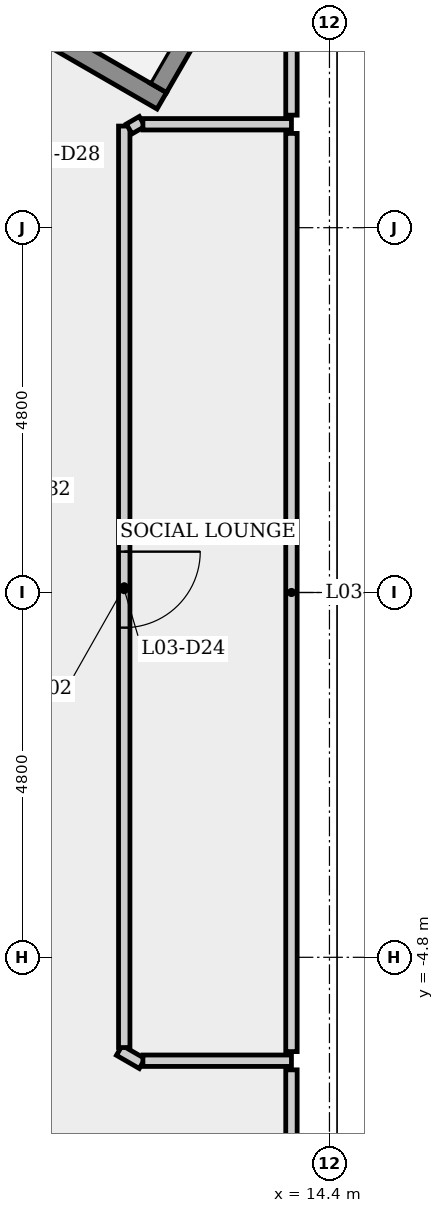
"""IFC4 building model, lengths in metres.
Left out: names, types, materials, properties, quantities, classifications, styles, units other than length and angle.
Written with IfcOpenShell. Run it as: python <this file> out.ifc"""

import sys

from ifc_helpers import new_model, si_unit, direction, frame, frame_2d, origin, place, context, subcontext, project, spatial, rectangle, extrude, element, fill, save


model = new_model("IFC4")
c1 = context("Model", 3, precision=1e-05, world=origin(), true_north=direction((0.0, 1.0)))
c2 = subcontext(c1, "Body", "Model", "MODEL_VIEW")
j1 = project(units=[si_unit("LENGTHUNIT", "METRE"), si_unit("PLANEANGLEUNIT", "RADIAN")], contexts=[c1])
p1 = place(None, origin())
s1 = spatial("IfcSite", under=j1, at=p1, CompositionType="ELEMENT")
p2 = place(p1, origin())
s2 = spatial("IfcBuilding", under=s1, at=p2, CompositionType="ELEMENT")
p3 = place(p2, frame((0.0, 0.0, 16.0)))
s3 = spatial("IfcBuildingStorey", under=s2, at=p3, CompositionType="ELEMENT", Elevation=16.0)
p4 = place(p3, frame((11.635, -6.025, 0.0), z_axis=(0.0, 0.0, 1.0), x_axis=(0.866115353951, -0.499844169366, 0.0)))
e1 = element("IfcWall", 1, at=p4, inside=s3, PredefinedType="PARTITIONING", context=c2, shape_type="SweptSolid", body=[
    extrude(rectangle(XDim=0.347, YDim=0.15, at=frame_2d((0.174, 0.0))), origin(), (0.0, 0.0, 1.0), 4.05),
])
p5 = place(p3, frame((11.7, 6.137, 0.0), z_axis=(0.0, 0.0, 1.0), x_axis=(0.0, -1.0, 0.0)))
e2 = element("IfcWall", 2, at=p5, inside=s3, PredefinedType="PARTITIONING", context=c2, shape_type="SweptSolid", body=[
    extrude(rectangle(XDim=12.125, YDim=0.15, at=frame_2d((6.062, 0.0))), origin(), (0.0, 0.0, 1.0), 4.05),
])
p6 = place(p5, frame((5.6, 0.0, 0.0)))
e3 = element("IfcOpeningElement", 3, at=p6, cuts=e2, PredefinedType="OPENING", context=c2, shape_type="SweptSolid", body=[
    extrude(rectangle(XDim=1.0, YDim=2.1, at=frame_2d((0.5, 1.05))), frame((0.0, 0.085, 0.0), z_axis=(0.0, -1.0, 0.0), x_axis=(1.0, 0.0, 0.0)), (0.0, 0.0, 1.0), 0.17),
])
p7 = place(p3, frame((11.946, -6.161, 0.0), z_axis=(0.0, 0.0, 1.0), x_axis=(1.0, 0.0, 0.0)))
e4 = element("IfcWall", 4, at=p7, inside=s3, PredefinedType="PARTITIONING", context=c2, shape_type="SweptSolid", body=[
    extrude(rectangle(XDim=1.954, YDim=0.15, at=frame_2d((0.977, 0.0))), origin(), (0.0, 0.0, 1.0), 4.05),
])
p8 = place(p3, frame((11.936, 6.198, 0.0), z_axis=(0.0, 0.0, 1.0), x_axis=(-0.866103179807, -0.499865263774, 0.0)))
e5 = element("IfcWall", 5, at=p8, inside=s3, PredefinedType="PARTITIONING", context=c2, shape_type="SweptSolid", body=[
    extrude(rectangle(XDim=0.197, YDim=0.15, at=frame_2d((0.099, 0.0))), origin(), (0.0, 0.0, 1.0), 4.05),
])
p9 = place(p3, frame((12.194, 6.47, 0.0), z_axis=(0.0, 0.0, 1.0), x_axis=(-0.866025499775, 0.499999833739, 0.0)))
e6 = element("IfcWall", 6, at=p9, inside=s3, PredefinedType="SHEAR", context=c2, shape_type="SweptSolid", body=[
    extrude(rectangle(XDim=6.4, YDim=0.25, at=frame_2d((3.2, 0.0))), origin(), (0.0, 0.0, 1.0), 4.05),
])
p10 = place(p9, frame((5.25, 0.0, 0.0)))
e7 = element("IfcOpeningElement", 7, at=p10, cuts=e6, PredefinedType="OPENING", context=c2, shape_type="SweptSolid", body=[
    extrude(rectangle(XDim=1.0, YDim=2.1, at=frame_2d((0.5, 1.05))), frame((0.0, 0.135, 0.0), z_axis=(0.0, -1.0, 0.0), x_axis=(1.0, 0.0, 0.0)), (0.0, 0.0, 1.0), 0.27),
])
p11 = place(p3, frame((13.755, 9.424, 0.0), z_axis=(0.0, 0.0, 1.0), x_axis=(-0.500011789842, -0.866018596809, 0.0)))
e8 = element("IfcWall", 8, at=p11, inside=s3, PredefinedType="SHEAR", context=c2, shape_type="SweptSolid", body=[
    extrude(rectangle(XDim=3.214, YDim=0.25, at=frame_2d((1.607, 0.0))), origin(), (0.0, 0.0, 1.0), 4.05),
])
p12 = place(p3, frame((13.9, -6.281, 0.0), z_axis=(0.0, 0.0, 1.0), x_axis=(0.0, -1.0, 0.0)))
e9 = element("IfcWall", 9, at=p12, inside=s3, PredefinedType="PARTITIONING", context=c2, shape_type="SweptSolid", body=[
    extrude(rectangle(XDim=3.012, YDim=0.15, at=frame_2d((1.506, 0.0))), origin(), (0.0, 0.0, 1.0), 4.05),
])
p13 = place(p3, frame((13.9, 6.041, 0.0), z_axis=(0.0, 0.0, 1.0), x_axis=(0.0, -1.0, 0.0)))
e10 = element("IfcWall", 10, at=p13, inside=s3, PredefinedType="PARTITIONING", context=c2, shape_type="SweptSolid", body=[
    extrude(rectangle(XDim=12.082, YDim=0.15, at=frame_2d((6.041, 0.0))), origin(), (0.0, 0.0, 1.0), 4.05),
])
p14 = place(p3, frame((13.9, 6.161, 0.0), z_axis=(0.0, 0.0, 1.0), x_axis=(-1.0, 0.0, 0.0)))
e11 = element("IfcWall", 11, at=p14, inside=s3, PredefinedType="PARTITIONING", context=c2, shape_type="SweptSolid", body=[
    extrude(rectangle(XDim=1.954, YDim=0.15, at=frame_2d((0.977, 0.0))), origin(), (0.0, 0.0, 1.0), 4.05),
])
p15 = place(p3, frame((13.9, 9.443, 0.0), z_axis=(0.0, 0.0, 1.0), x_axis=(0.0, -1.0, 0.0)))
e12 = element("IfcWall", 12, at=p15, inside=s3, PredefinedType="PARTITIONING", context=c2, shape_type="SweptSolid", body=[
    extrude(rectangle(XDim=3.162, YDim=0.15, at=frame_2d((1.581, 0.0))), origin(), (0.0, 0.0, 1.0), 4.05),
])
p16 = place(p6, origin())
e13 = element("IfcDoor", 13, at=p16, inside=s3, OperationType="SINGLE_SWING_LEFT", PredefinedType="DOOR", context=c2, shape_type="SweptSolid", body=[
    extrude(rectangle(XDim=1.0, YDim=2.1, at=frame_2d((0.5, 1.05))), frame((0.0, 0.025, 0.0), z_axis=(0.0, -1.0, 0.0), x_axis=(1.0, 0.0, 0.0)), (0.0, 0.0, 1.0), 0.05),
])
fill(e3, e13)
save(model, sys.argv[1])
